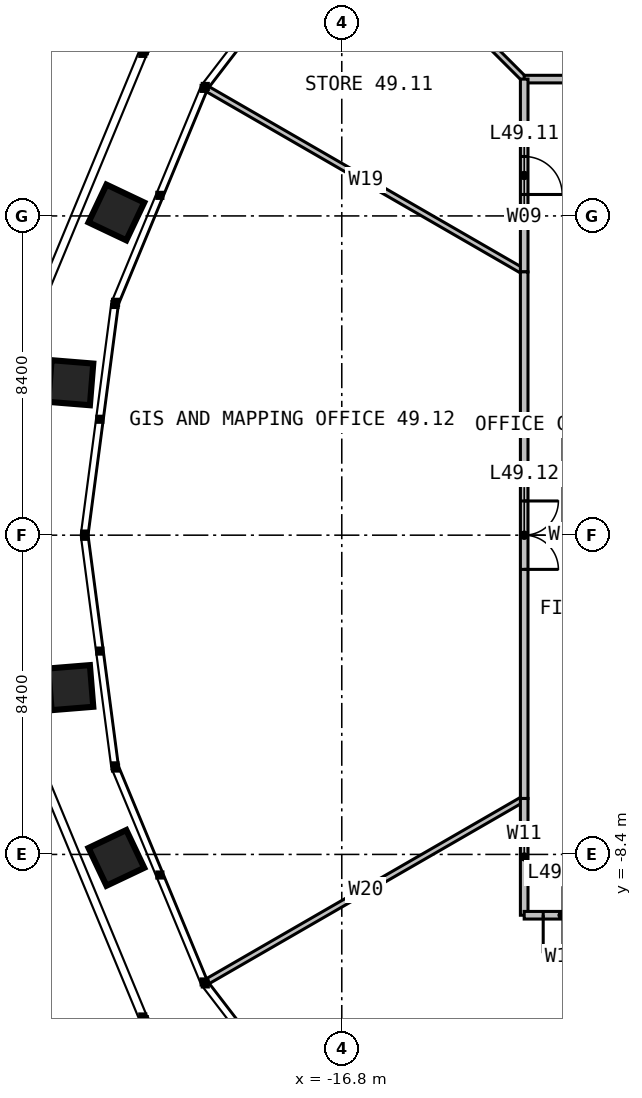
"""IFC4 building model, lengths in metres.
Left out: names, types, materials, properties, quantities, classifications, styles, units other than length and angle.
Written with IfcOpenShell. Run it as: python <this file> out.ifc"""

import sys

from ifc_helpers import new_model, si_unit, direction, frame, frame_2d, origin, place, context, subcontext, project, spatial, rectangle, extrude, element, fill, save


model = new_model("IFC4")
c1 = context("Model", 3, precision=1e-05, world=origin(), true_north=direction((0.0, 1.0)))
c2 = subcontext(c1, "Body", "Model", "MODEL_VIEW")
j1 = project(units=[si_unit("LENGTHUNIT", "METRE"), si_unit("PLANEANGLEUNIT", "RADIAN")], contexts=[c1])
p1 = place(None, origin())
s1 = spatial("IfcSite", under=j1, at=p1, CompositionType="ELEMENT")
p2 = place(p1, origin())
s2 = spatial("IfcBuilding", under=s1, at=p2, CompositionType="ELEMENT")
p3 = place(p2, frame((0.0, 0.0, 203.0)))
s3 = spatial("IfcBuildingStorey", under=s2, at=p3, CompositionType="ELEMENT", Elevation=203.0)
p4 = place(p3, frame((-6.928, 12.0, 0.0), z_axis=(0.0, 0.0, 1.0), x_axis=(-0.499990471717, 0.866030904871, 0.0)))
e1 = element("IfcWall", 1, at=p4, inside=s3, PredefinedType="PARTITIONING", context=c2, shape_type="SweptSolid", body=[
    extrude(rectangle(XDim=9.62, YDim=0.15, at=frame_2d((4.81, 0.0))), origin(), (0.0, 0.0, 1.0), 2.79),
])
p5 = place(p3, frame((-12.0, 12.0, 0.0), z_axis=(0.0, 0.0, 1.0), x_axis=(-0.707106781187, 0.707106781187, 0.0)))
e2 = element("IfcWall", 2, at=p5, inside=s3, PredefinedType="PARTITIONING", context=c2, shape_type="SweptSolid", body=[
    extrude(rectangle(XDim=6.506, YDim=0.15, at=frame_2d((3.253, 0.0))), origin(), (0.0, 0.0, 1.0), 2.79),
])
for number, where, z_axis, x_axis in (
    (3, (-12.0, 6.928, 0.0), (0.0, 0.0, 1.0), (-0.866, 0.5, 0.0)),
    (4, (-12.0, -6.928, 0.0), (0.0, 0.0, 1.0), (-0.866, -0.5, 0.0)),
):
    element("IfcWall", number, at=place(p3, frame(where, z_axis=z_axis, x_axis=x_axis)), inside=s3, PredefinedType="PARTITIONING", context=c2, shape_type="SweptSolid", body=[
        extrude(rectangle(XDim=9.62, YDim=0.15, at=frame_2d((4.81, 0.0))), origin(), (0.0, 0.0, 1.0), 2.79),
    ])
p6 = place(p3, frame((-6.928, 12.0, 0.0), z_axis=(0.0, 0.0, 1.0), x_axis=(-1.0, 0.0, 0.0)))
e5 = element("IfcWall", 5, at=p6, inside=s3, PredefinedType="PARTITIONING", context=c2, shape_type="SweptSolid", body=[
    extrude(rectangle(XDim=5.072, YDim=0.2, at=frame_2d((2.536, 0.0))), origin(), (0.0, 0.0, 1.0), 3.8),
])
p7 = place(p6, frame((2.036, 0.0, 0.0)))
e6 = element("IfcOpeningElement", 6, at=p7, cuts=e5, PredefinedType="OPENING", context=c2, shape_type="SweptSolid", body=[
    extrude(rectangle(XDim=1.0, YDim=2.2, at=frame_2d((0.5, 1.1))), frame((0.0, 0.11, 0.0), z_axis=(0.0, -1.0, 0.0), x_axis=(1.0, 0.0, 0.0)), (0.0, 0.0, 1.0), 0.22),
])
p8 = place(p3, frame((-12.0, 12.0, 0.0), z_axis=(0.0, 0.0, 1.0), x_axis=(0.0, -1.0, 0.0)))
e7 = element("IfcWall", 7, at=p8, inside=s3, PredefinedType="PARTITIONING", context=c2, shape_type="SweptSolid", body=[
    extrude(rectangle(XDim=5.072, YDim=0.2, at=frame_2d((2.536, 0.0))), origin(), (0.0, 0.0, 1.0), 3.8),
])
p9 = place(p8, frame((2.036, 0.0, 0.0)))
e8 = element("IfcOpeningElement", 8, at=p9, cuts=e7, PredefinedType="OPENING", context=c2, shape_type="SweptSolid", body=[
    extrude(rectangle(XDim=1.0, YDim=2.2, at=frame_2d((0.5, 1.1))), frame((0.0, 0.11, 0.0), z_axis=(0.0, -1.0, 0.0), x_axis=(1.0, 0.0, 0.0)), (0.0, 0.0, 1.0), 0.22),
])
p10 = place(p3, frame((-12.0, 6.928, 0.0), z_axis=(0.0, 0.0, 1.0), x_axis=(0.0, -1.0, 0.0)))
e9 = element("IfcWall", 9, at=p10, inside=s3, PredefinedType="PARTITIONING", context=c2, shape_type="SweptSolid", body=[
    extrude(rectangle(XDim=13.856, YDim=0.2, at=frame_2d((6.928, 0.0))), origin(), (0.0, 0.0, 1.0), 3.8),
])
p11 = place(p10, frame((6.028, 0.0, 0.0)))
e10 = element("IfcOpeningElement", 10, at=p11, cuts=e9, PredefinedType="OPENING", context=c2, shape_type="SweptSolid", body=[
    extrude(rectangle(XDim=1.8, YDim=2.2, at=frame_2d((0.9, 1.1))), frame((0.0, 0.11, 0.0), z_axis=(0.0, -1.0, 0.0), x_axis=(1.0, 0.0, 0.0)), (0.0, 0.0, 1.0), 0.22),
])
p12 = place(p3, frame((-12.0, -6.928, 0.0), z_axis=(0.0, 0.0, 1.0), x_axis=(0.0, -1.0, 0.0)))
e11 = element("IfcWall", 11, at=p12, inside=s3, PredefinedType="PARTITIONING", context=c2, shape_type="SweptSolid", body=[
    extrude(rectangle(XDim=3.072, YDim=0.2, at=frame_2d((1.536, 0.0))), origin(), (0.0, 0.0, 1.0), 3.8),
])
p13 = place(p3, frame((-10.0, -10.0, 0.0), z_axis=(0.0, 0.0, 1.0), x_axis=(-1.0, 0.0, 0.0)))
e12 = element("IfcWall", 12, at=p13, inside=s3, PredefinedType="PARTITIONING", context=c2, shape_type="SweptSolid", body=[
    extrude(rectangle(XDim=2.0, YDim=0.2, at=frame_2d((1.0, 0.0))), origin(), (0.0, 0.0, 1.0), 3.8),
])
p14 = place(p13, frame((0.5, 0.0, 0.0)))
e13 = element("IfcOpeningElement", 13, at=p14, cuts=e12, PredefinedType="OPENING", context=c2, shape_type="SweptSolid", body=[
    extrude(rectangle(XDim=1.0, YDim=2.2, at=frame_2d((0.5, 1.1))), frame((0.0, 0.11, 0.0), z_axis=(0.0, -1.0, 0.0), x_axis=(1.0, 0.0, 0.0)), (0.0, 0.0, 1.0), 0.22),
])
p15 = place(p9, origin())
e14 = element("IfcDoor", 14, at=p15, inside=s3, OperationType="SINGLE_SWING_RIGHT", PredefinedType="DOOR", context=c2, shape_type="SweptSolid", body=[
    extrude(rectangle(XDim=1.0, YDim=2.2, at=frame_2d((0.5, 1.1))), frame((0.0, 0.025, 0.0), z_axis=(0.0, -1.0, 0.0), x_axis=(1.0, 0.0, 0.0)), (0.0, 0.0, 1.0), 0.05),
])
fill(e8, e14)
p16 = place(p11, origin())
e15 = element("IfcDoor", 15, at=p16, inside=s3, OperationType="DOUBLE_DOOR_SINGLE_SWING", PredefinedType="DOOR", context=c2, shape_type="SweptSolid", body=[
    extrude(rectangle(XDim=1.8, YDim=2.2, at=frame_2d((0.9, 1.1))), frame((0.0, 0.025, 0.0), z_axis=(0.0, -1.0, 0.0), x_axis=(1.0, 0.0, 0.0)), (0.0, 0.0, 1.0), 0.05),
])
fill(e10, e15)
p17 = place(p14, origin())
e16 = element("IfcDoor", 16, at=p17, inside=s3, OperationType="SINGLE_SWING_RIGHT", PredefinedType="DOOR", context=c2, shape_type="SweptSolid", body=[
    extrude(rectangle(XDim=1.0, YDim=2.2, at=frame_2d((0.5, 1.1))), frame((0.0, 0.025, 0.0), z_axis=(0.0, -1.0, 0.0), x_axis=(1.0, 0.0, 0.0)), (0.0, 0.0, 1.0), 0.05),
])
fill(e13, e16)
save(model, sys.argv[1])
